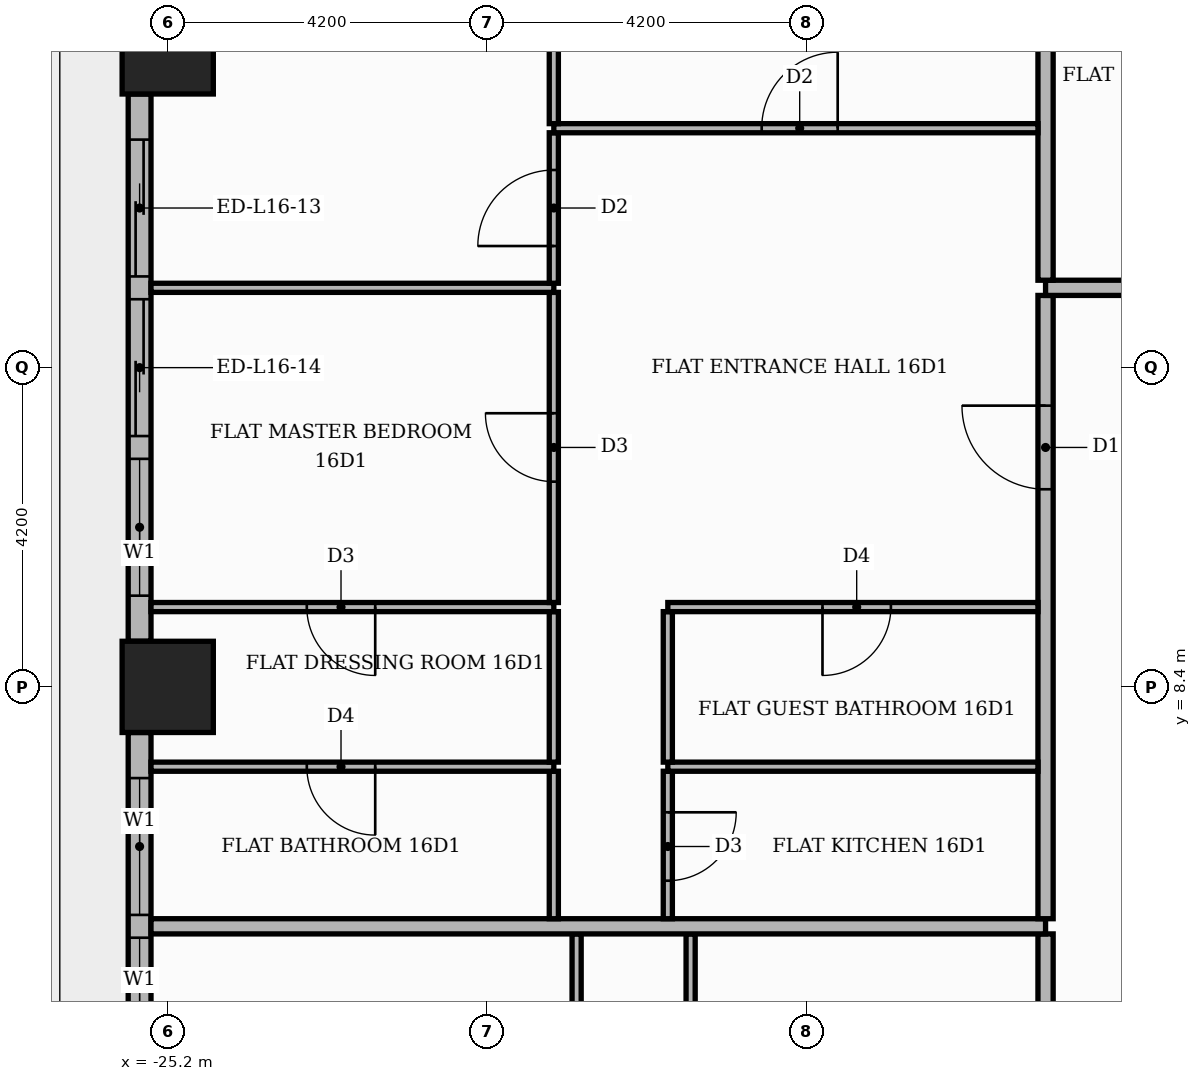
"""IFC4 building model, lengths in metres.
Left out: names, types, materials, properties, quantities, classifications, styles, units other than length and angle.
Written with IfcOpenShell. Run it as: python <this file> out.ifc"""

import sys

from ifc_helpers import new_model, si_unit, direction, frame, frame_2d, origin, origin_2d, place, context, subcontext, project, spatial, rectangle, extrude, element, fill, save


model = new_model("IFC4")
c1 = context("Model", 3, precision=1e-05, world=origin(), true_north=direction((0.0, 1.0)))
c2 = subcontext(c1, "Body", "Model", "MODEL_VIEW")
j1 = project(units=[si_unit("LENGTHUNIT", "METRE"), si_unit("PLANEANGLEUNIT", "RADIAN")], contexts=[c1])
p1 = place(None, origin())
s1 = spatial("IfcSite", under=j1, at=p1, CompositionType="ELEMENT")
p2 = place(p1, origin())
s2 = spatial("IfcBuilding", under=s1, at=p2, CompositionType="ELEMENT")
p3 = place(p2, frame((0.0, 0.0, 69.9)))
s3 = spatial("IfcBuildingStorey", under=s2, at=p3, CompositionType="ELEMENT", Elevation=69.9)
for number, where, z_axis, x_axis in (
    (1, (-25.2, 8.4, 0.0), (0.0, 0.0, 1.0), (1.0, 0.0, 0.0)),
    (2, (-25.2, 16.8, 0.0), (0.0, 0.0, 1.0), (1.0, 0.0, 0.0)),
):
    element("IfcColumn", number, at=place(p3, frame(where, z_axis=z_axis, x_axis=x_axis)), inside=s3, PredefinedType="COLUMN", context=c2, shape_type="SweptSolid", body=[
        extrude(rectangle(XDim=1.2, YDim=1.2, at=origin_2d()), origin(), (0.0, 0.0, 1.0), 3.9),
    ])
p4 = place(p3, frame((-25.57, 16.2, 0.0), z_axis=(0.0, 0.0, 1.0), x_axis=(0.0, -1.0, 0.0)))
e3 = element("IfcWall", 3, at=p4, inside=s3, PredefinedType="STANDARD", context=c2, shape_type="SweptSolid", body=[
    extrude(rectangle(XDim=7.2, YDim=0.3, at=frame_2d((3.6, 0.0))), origin(), (0.0, 0.0, 1.0), 3.4),
])
p5 = place(p4, frame((0.6, 0.0, 0.0)))
e4 = element("IfcOpeningElement", 4, at=p5, cuts=e3, PredefinedType="OPENING", context=c2, shape_type="SweptSolid", body=[
    extrude(rectangle(XDim=1.8, YDim=2.4, at=frame_2d((0.9, 1.2))), frame((0.0, 0.16, 0.0), z_axis=(0.0, -1.0, 0.0), x_axis=(1.0, 0.0, 0.0)), (0.0, 0.0, 1.0), 0.32),
])
p6 = place(p4, frame((2.7, 0.0, 0.0)))
e5 = element("IfcOpeningElement", 5, at=p6, cuts=e3, PredefinedType="OPENING", context=c2, shape_type="SweptSolid", body=[
    extrude(rectangle(XDim=1.8, YDim=2.4, at=frame_2d((0.9, 1.2))), frame((0.0, 0.16, 0.0), z_axis=(0.0, -1.0, 0.0), x_axis=(1.0, 0.0, 0.0)), (0.0, 0.0, 1.0), 0.32),
])
p7 = place(p4, frame((4.8, 0.0, 0.9)))
e6 = element("IfcOpeningElement", 6, at=p7, cuts=e3, PredefinedType="OPENING", context=c2, shape_type="SweptSolid", body=[
    extrude(rectangle(XDim=1.8, YDim=2.1, at=frame_2d((0.9, 1.05))), frame((0.0, 0.16, 0.0), z_axis=(0.0, -1.0, 0.0), x_axis=(1.0, 0.0, 0.0)), (0.0, 0.0, 1.0), 0.32),
])
p8 = place(p3, frame((-25.57, 7.8, 0.0), z_axis=(0.0, 0.0, 1.0), x_axis=(0.0, -1.0, 0.0)))
e7 = element("IfcWall", 7, at=p8, inside=s3, PredefinedType="STANDARD", context=c2, shape_type="SweptSolid", body=[
    extrude(rectangle(XDim=7.2, YDim=0.3, at=frame_2d((3.6, 0.0))), origin(), (0.0, 0.0, 1.0), 3.4),
])
p9 = place(p8, frame((0.6, 0.0, 0.9)))
e8 = element("IfcOpeningElement", 8, at=p9, cuts=e7, PredefinedType="OPENING", context=c2, shape_type="SweptSolid", body=[
    extrude(rectangle(XDim=1.8, YDim=2.1, at=frame_2d((0.9, 1.05))), frame((0.0, 0.16, 0.0), z_axis=(0.0, -1.0, 0.0), x_axis=(1.0, 0.0, 0.0)), (0.0, 0.0, 1.0), 0.32),
])
p10 = place(p8, frame((2.7, 0.0, 0.9)))
e9 = element("IfcOpeningElement", 9, at=p10, cuts=e7, PredefinedType="OPENING", context=c2, shape_type="SweptSolid", body=[
    extrude(rectangle(XDim=1.8, YDim=2.1, at=frame_2d((0.9, 1.05))), frame((0.0, 0.16, 0.0), z_axis=(0.0, -1.0, 0.0), x_axis=(1.0, 0.0, 0.0)), (0.0, 0.0, 1.0), 0.32),
])
p11 = place(p8, frame((4.8, 0.0, 0.0)))
e10 = element("IfcOpeningElement", 10, at=p11, cuts=e7, PredefinedType="OPENING", context=c2, shape_type="SweptSolid", body=[
    extrude(rectangle(XDim=1.8, YDim=2.4, at=frame_2d((0.9, 1.2))), frame((0.0, 0.16, 0.0), z_axis=(0.0, -1.0, 0.0), x_axis=(1.0, 0.0, 0.0)), (0.0, 0.0, 1.0), 0.32),
])
p12 = place(p3, frame((-13.65, -13.55, 0.0), z_axis=(0.0, 0.0, 1.0), x_axis=(0.0, 1.0, 0.0)))
e11 = element("IfcWall", 11, at=p12, inside=s3, PredefinedType="PARTITIONING", context=c2, shape_type="SweptSolid", body=[
    extrude(rectangle(XDim=18.7, YDim=0.2, at=frame_2d((9.35, 0.0))), origin(), (0.0, 0.0, 1.0), 3.4),
])
p13 = place(p12, frame((11.95, 0.0, 0.0)))
e12 = element("IfcOpeningElement", 12, at=p13, cuts=e11, PredefinedType="OPENING", context=c2, shape_type="SweptSolid", body=[
    extrude(rectangle(XDim=1.1, YDim=2.4, at=frame_2d((0.55, 1.2))), frame((0.0, 0.11, 0.0), z_axis=(0.0, -1.0, 0.0), x_axis=(1.0, 0.0, 0.0)), (0.0, 0.0, 1.0), 0.22),
])
p14 = place(p3, frame((-19.82, -3.09, 0.0), z_axis=(0.0, 0.0, 1.0), x_axis=(0.0, 1.0, 0.0)))
e13 = element("IfcWall", 13, at=p14, inside=s3, PredefinedType="PARTITIONING", context=c2, shape_type="SweptSolid", body=[
    extrude(rectangle(XDim=8.24, YDim=0.12, at=frame_2d((4.12, 0.0))), origin(), (0.0, 0.0, 1.0), 3.4),
])
p15 = place(p14, frame((3.64, 0.0, 0.0)))
e14 = element("IfcOpeningElement", 14, at=p15, cuts=e13, PredefinedType="OPENING", context=c2, shape_type="SweptSolid", body=[
    extrude(rectangle(XDim=1.0, YDim=2.1, at=frame_2d((0.5, 1.05))), frame((0.0, 0.07, 0.0), z_axis=(0.0, -1.0, 0.0), x_axis=(1.0, 0.0, 0.0)), (0.0, 0.0, 1.0), 0.14),
])
p16 = place(p3, frame((-18.32, 1.11, 0.0), z_axis=(0.0, 0.0, 1.0), x_axis=(0.0, 1.0, 0.0)))
e15 = element("IfcWall", 15, at=p16, inside=s3, PredefinedType="PARTITIONING", context=c2, shape_type="SweptSolid", body=[
    extrude(rectangle(XDim=4.04, YDim=0.12, at=frame_2d((2.02, 0.0))), origin(), (0.0, 0.0, 1.0), 3.4),
])
p17 = place(p3, frame((-25.42, 5.25, 0.0), z_axis=(0.0, 0.0, 1.0), x_axis=(1.0, 0.0, 0.0)))
e16 = element("IfcWall", 16, at=p17, inside=s3, PredefinedType="PARTITIONING", context=c2, shape_type="SweptSolid", body=[
    extrude(rectangle(XDim=11.77, YDim=0.2, at=frame_2d((5.885, 0.0))), origin(), (0.0, 0.0, 1.0), 3.4),
])
p18 = place(p3, frame((-20.12, 5.35, 0.0), z_axis=(0.0, 0.0, 1.0), x_axis=(0.0, 1.0, 0.0)))
e17 = element("IfcWall", 17, at=p18, inside=s3, PredefinedType="PARTITIONING", context=c2, shape_type="SweptSolid", body=[
    extrude(rectangle(XDim=1.94, YDim=0.12, at=frame_2d((0.97, 0.0))), origin(), (0.0, 0.0, 1.0), 3.4),
])
p19 = place(p3, frame((-18.62, 5.35, 0.0), z_axis=(0.0, 0.0, 1.0), x_axis=(0.0, 1.0, 0.0)))
e18 = element("IfcWall", 18, at=p19, inside=s3, PredefinedType="PARTITIONING", context=c2, shape_type="SweptSolid", body=[
    extrude(rectangle(XDim=1.94, YDim=0.12, at=frame_2d((0.97, 0.0))), origin(), (0.0, 0.0, 1.0), 3.4),
])
p20 = place(p19, frame((0.5, 0.0, 0.0)))
e19 = element("IfcOpeningElement", 19, at=p20, cuts=e18, PredefinedType="OPENING", context=c2, shape_type="SweptSolid", body=[
    extrude(rectangle(XDim=0.9, YDim=2.1, at=frame_2d((0.45, 1.05))), frame((0.0, 0.07, 0.0), z_axis=(0.0, -1.0, 0.0), x_axis=(1.0, 0.0, 0.0)), (0.0, 0.0, 1.0), 0.14),
])
p21 = place(p3, frame((-13.65, 5.35, 0.0), z_axis=(0.0, 0.0, 1.0), x_axis=(0.0, 1.0, 0.0)))
e20 = element("IfcWall", 20, at=p21, inside=s3, PredefinedType="PARTITIONING", context=c2, shape_type="SweptSolid", body=[
    extrude(rectangle(XDim=8.2, YDim=0.2, at=frame_2d((4.1, 0.0))), origin(), (0.0, 0.0, 1.0), 3.4),
])
p22 = place(p21, frame((5.65, 0.0, 0.0)))
e21 = element("IfcOpeningElement", 21, at=p22, cuts=e20, PredefinedType="OPENING", context=c2, shape_type="SweptSolid", body=[
    extrude(rectangle(XDim=1.1, YDim=2.4, at=frame_2d((0.55, 1.2))), frame((0.0, 0.11, 0.0), z_axis=(0.0, -1.0, 0.0), x_axis=(1.0, 0.0, 0.0)), (0.0, 0.0, 1.0), 0.22),
])
p23 = place(p3, frame((-25.42, 7.35, 0.0), z_axis=(0.0, 0.0, 1.0), x_axis=(1.0, 0.0, 0.0)))
e22 = element("IfcWall", 22, at=p23, inside=s3, PredefinedType="PARTITIONING", context=c2, shape_type="SweptSolid", body=[
    extrude(rectangle(XDim=5.3, YDim=0.12, at=frame_2d((2.65, 0.0))), origin(), (0.0, 0.0, 1.0), 3.4),
])
p24 = place(p23, frame((2.05, 0.0, 0.0)))
e23 = element("IfcOpeningElement", 23, at=p24, cuts=e22, PredefinedType="OPENING", context=c2, shape_type="SweptSolid", body=[
    extrude(rectangle(XDim=0.9, YDim=2.1, at=frame_2d((0.45, 1.05))), frame((0.0, 0.07, 0.0), z_axis=(0.0, -1.0, 0.0), x_axis=(1.0, 0.0, 0.0)), (0.0, 0.0, 1.0), 0.14),
])
p25 = place(p3, frame((-18.62, 7.35, 0.0), z_axis=(0.0, 0.0, 1.0), x_axis=(1.0, 0.0, 0.0)))
e24 = element("IfcWall", 24, at=p25, inside=s3, PredefinedType="PARTITIONING", context=c2, shape_type="SweptSolid", body=[
    extrude(rectangle(XDim=4.87, YDim=0.12, at=frame_2d((2.435, 0.0))), origin(), (0.0, 0.0, 1.0), 3.4),
])
for number, where, z_axis, x_axis in (
    (25, (-20.12, 7.41, 0.0), (0.0, 0.0, 1.0), (0.0, 1.0, 0.0)),
    (26, (-18.62, 7.41, 0.0), (0.0, 0.0, 1.0), (0.0, 1.0, 0.0)),
):
    element("IfcWall", number, at=place(p3, frame(where, z_axis=z_axis, x_axis=x_axis)), inside=s3, PredefinedType="PARTITIONING", context=c2, shape_type="SweptSolid", body=[
        extrude(rectangle(XDim=1.98, YDim=0.12, at=frame_2d((0.99, 0.0))), origin(), (0.0, 0.0, 1.0), 3.4),
    ])
p26 = place(p3, frame((-25.42, 9.45, 0.0), z_axis=(0.0, 0.0, 1.0), x_axis=(1.0, 0.0, 0.0)))
e27 = element("IfcWall", 27, at=p26, inside=s3, PredefinedType="PARTITIONING", context=c2, shape_type="SweptSolid", body=[
    extrude(rectangle(XDim=5.3, YDim=0.12, at=frame_2d((2.65, 0.0))), origin(), (0.0, 0.0, 1.0), 3.4),
])
p27 = place(p26, frame((2.05, 0.0, 0.0)))
e28 = element("IfcOpeningElement", 28, at=p27, cuts=e27, PredefinedType="OPENING", context=c2, shape_type="SweptSolid", body=[
    extrude(rectangle(XDim=0.9, YDim=2.1, at=frame_2d((0.45, 1.05))), frame((0.0, 0.07, 0.0), z_axis=(0.0, -1.0, 0.0), x_axis=(1.0, 0.0, 0.0)), (0.0, 0.0, 1.0), 0.14),
])
p28 = place(p3, frame((-18.62, 9.45, 0.0), z_axis=(0.0, 0.0, 1.0), x_axis=(1.0, 0.0, 0.0)))
e29 = element("IfcWall", 29, at=p28, inside=s3, PredefinedType="PARTITIONING", context=c2, shape_type="SweptSolid", body=[
    extrude(rectangle(XDim=4.87, YDim=0.12, at=frame_2d((2.435, 0.0))), origin(), (0.0, 0.0, 1.0), 3.4),
])
p29 = place(p28, frame((2.035, 0.0, 0.0)))
e30 = element("IfcOpeningElement", 30, at=p29, cuts=e29, PredefinedType="OPENING", context=c2, shape_type="SweptSolid", body=[
    extrude(rectangle(XDim=0.9, YDim=2.1, at=frame_2d((0.45, 1.05))), frame((0.0, 0.07, 0.0), z_axis=(0.0, -1.0, 0.0), x_axis=(1.0, 0.0, 0.0)), (0.0, 0.0, 1.0), 0.14),
])
p30 = place(p3, frame((-20.12, 9.51, 0.0), z_axis=(0.0, 0.0, 1.0), x_axis=(0.0, 1.0, 0.0)))
e31 = element("IfcWall", 31, at=p30, inside=s3, PredefinedType="PARTITIONING", context=c2, shape_type="SweptSolid", body=[
    extrude(rectangle(XDim=4.08, YDim=0.12, at=frame_2d((2.04, 0.0))), origin(), (0.0, 0.0, 1.0), 3.4),
])
p31 = place(p30, frame((1.59, 0.0, 0.0)))
e32 = element("IfcOpeningElement", 32, at=p31, cuts=e31, PredefinedType="OPENING", context=c2, shape_type="SweptSolid", body=[
    extrude(rectangle(XDim=0.9, YDim=2.1, at=frame_2d((0.45, 1.05))), frame((0.0, 0.07, 0.0), z_axis=(0.0, -1.0, 0.0), x_axis=(1.0, 0.0, 0.0)), (0.0, 0.0, 1.0), 0.14),
])
p32 = place(p3, frame((-25.42, 13.65, 0.0), z_axis=(0.0, 0.0, 1.0), x_axis=(1.0, 0.0, 0.0)))
e33 = element("IfcWall", 33, at=p32, inside=s3, PredefinedType="PARTITIONING", context=c2, shape_type="SweptSolid", body=[
    extrude(rectangle(XDim=5.3, YDim=0.12, at=frame_2d((2.65, 0.0))), origin(), (0.0, 0.0, 1.0), 3.4),
])
p33 = place(p3, frame((-13.65, 13.65, 0.0), z_axis=(0.0, 0.0, 1.0), x_axis=(1.0, 0.0, 0.0)))
e34 = element("IfcWall", 34, at=p33, inside=s3, PredefinedType="PARTITIONING", context=c2, shape_type="SweptSolid", body=[
    extrude(rectangle(XDim=39.07, YDim=0.2, at=frame_2d((19.535, 0.0))), origin(), (0.0, 0.0, 1.0), 3.4),
])
p34 = place(p33, frame((23.6, 0.0, 0.0)))
e35 = element("IfcOpeningElement", 35, at=p34, cuts=e34, PredefinedType="OPENING", context=c2, shape_type="SweptSolid", body=[
    extrude(rectangle(XDim=1.1, YDim=2.4, at=frame_2d((0.55, 1.2))), frame((0.0, 0.11, 0.0), z_axis=(0.0, -1.0, 0.0), x_axis=(1.0, 0.0, 0.0)), (0.0, 0.0, 1.0), 0.22),
])
p35 = place(p3, frame((-20.12, 13.71, 0.0), z_axis=(0.0, 0.0, 1.0), x_axis=(0.0, 1.0, 0.0)))
e36 = element("IfcWall", 36, at=p35, inside=s3, PredefinedType="PARTITIONING", context=c2, shape_type="SweptSolid", body=[
    extrude(rectangle(XDim=1.98, YDim=0.12, at=frame_2d((0.99, 0.0))), origin(), (0.0, 0.0, 1.0), 3.4),
])
p36 = place(p35, frame((0.49, 0.0, 0.0)))
e37 = element("IfcOpeningElement", 37, at=p36, cuts=e36, PredefinedType="OPENING", context=c2, shape_type="SweptSolid", body=[
    extrude(rectangle(XDim=1.0, YDim=2.1, at=frame_2d((0.5, 1.05))), frame((0.0, 0.07, 0.0), z_axis=(0.0, -1.0, 0.0), x_axis=(1.0, 0.0, 0.0)), (0.0, 0.0, 1.0), 0.14),
])
p37 = place(p3, frame((-13.65, 13.75, 0.0), z_axis=(0.0, 0.0, 1.0), x_axis=(0.0, 1.0, 0.0)))
e38 = element("IfcWall", 38, at=p37, inside=s3, PredefinedType="PARTITIONING", context=c2, shape_type="SweptSolid", body=[
    extrude(rectangle(XDim=11.67, YDim=0.2, at=frame_2d((5.835, 0.0))), origin(), (0.0, 0.0, 1.0), 3.4),
])
p38 = place(p3, frame((-20.12, 15.75, 0.0), z_axis=(0.0, 0.0, 1.0), x_axis=(1.0, 0.0, 0.0)))
e39 = element("IfcWall", 39, at=p38, inside=s3, PredefinedType="PARTITIONING", context=c2, shape_type="SweptSolid", body=[
    extrude(rectangle(XDim=6.37, YDim=0.12, at=frame_2d((3.185, 0.0))), origin(), (0.0, 0.0, 1.0), 3.4),
])
p39 = place(p38, frame((2.735, 0.0, 0.0)))
e40 = element("IfcOpeningElement", 40, at=p39, cuts=e39, PredefinedType="OPENING", context=c2, shape_type="SweptSolid", body=[
    extrude(rectangle(XDim=1.0, YDim=2.1, at=frame_2d((0.5, 1.05))), frame((0.0, 0.07, 0.0), z_axis=(0.0, -1.0, 0.0), x_axis=(1.0, 0.0, 0.0)), (0.0, 0.0, 1.0), 0.14),
])
p40 = place(p3, frame((-20.12, 15.81, 0.0), z_axis=(0.0, 0.0, 1.0), x_axis=(0.0, 1.0, 0.0)))
e41 = element("IfcWall", 41, at=p40, inside=s3, PredefinedType="PARTITIONING", context=c2, shape_type="SweptSolid", body=[
    extrude(rectangle(XDim=1.49, YDim=0.12, at=frame_2d((0.745, 0.0))), origin(), (0.0, 0.0, 1.0), 3.4),
])
p41 = place(p5, origin())
e42 = element("IfcDoor", 42, at=p41, inside=s3, OperationType="SLIDING_TO_LEFT", PredefinedType="DOOR", context=c2, shape_type="SweptSolid", body=[
    extrude(rectangle(XDim=1.8, YDim=2.4, at=frame_2d((0.9, 1.2))), frame((0.0, 0.025, 0.0), z_axis=(0.0, -1.0, 0.0), x_axis=(1.0, 0.0, 0.0)), (0.0, 0.0, 1.0), 0.05),
])
fill(e4, e42)
p42 = place(p6, origin())
e43 = element("IfcDoor", 43, at=p42, inside=s3, OperationType="SLIDING_TO_RIGHT", PredefinedType="DOOR", context=c2, shape_type="SweptSolid", body=[
    extrude(rectangle(XDim=1.8, YDim=2.4, at=frame_2d((0.9, 1.2))), frame((0.0, 0.025, 0.0), z_axis=(0.0, -1.0, 0.0), x_axis=(1.0, 0.0, 0.0)), (0.0, 0.0, 1.0), 0.05),
])
fill(e5, e43)
p43 = place(p7, origin())
e44 = element("IfcWindow", 44, at=p43, inside=s3, PartitioningType="SINGLE_PANEL", PredefinedType="WINDOW", context=c2, shape_type="SweptSolid", body=[
    extrude(rectangle(XDim=1.8, YDim=2.1, at=frame_2d((0.9, 1.05))), frame((0.0, 0.03, 0.0), z_axis=(0.0, -1.0, 0.0), x_axis=(1.0, 0.0, 0.0)), (0.0, 0.0, 1.0), 0.06),
])
fill(e6, e44)
p44 = place(p9, origin())
e45 = element("IfcWindow", 45, at=p44, inside=s3, PartitioningType="SINGLE_PANEL", PredefinedType="WINDOW", context=c2, shape_type="SweptSolid", body=[
    extrude(rectangle(XDim=1.8, YDim=2.1, at=frame_2d((0.9, 1.05))), frame((0.0, 0.03, 0.0), z_axis=(0.0, -1.0, 0.0), x_axis=(1.0, 0.0, 0.0)), (0.0, 0.0, 1.0), 0.06),
])
fill(e8, e45)
p45 = place(p10, origin())
e46 = element("IfcWindow", 46, at=p45, inside=s3, PartitioningType="SINGLE_PANEL", PredefinedType="WINDOW", context=c2, shape_type="SweptSolid", body=[
    extrude(rectangle(XDim=1.8, YDim=2.1, at=frame_2d((0.9, 1.05))), frame((0.0, 0.03, 0.0), z_axis=(0.0, -1.0, 0.0), x_axis=(1.0, 0.0, 0.0)), (0.0, 0.0, 1.0), 0.06),
])
fill(e9, e46)
p46 = place(p22, origin())
e47 = element("IfcDoor", 47, at=p46, inside=s3, OperationType="SINGLE_SWING_RIGHT", PredefinedType="DOOR", context=c2, shape_type="SweptSolid", body=[
    extrude(rectangle(XDim=1.1, YDim=2.4, at=frame_2d((0.55, 1.2))), frame((0.0, 0.025, 0.0), z_axis=(0.0, -1.0, 0.0), x_axis=(1.0, 0.0, 0.0)), (0.0, 0.0, 1.0), 0.05),
])
fill(e21, e47)
p47 = place(p39, origin())
e48 = element("IfcDoor", 48, at=p47, inside=s3, OperationType="SINGLE_SWING_RIGHT", PredefinedType="DOOR", context=c2, shape_type="SweptSolid", body=[
    extrude(rectangle(XDim=1.0, YDim=2.1, at=frame_2d((0.5, 1.05))), frame((0.0, 0.025, 0.0), z_axis=(0.0, -1.0, 0.0), x_axis=(1.0, 0.0, 0.0)), (0.0, 0.0, 1.0), 0.05),
])
fill(e40, e48)
p48 = place(p29, frame((0.9, 0.0, 0.0), z_axis=(0.0, 0.0, 1.0), x_axis=(-1.0, 0.0, 0.0)))
e49 = element("IfcDoor", 49, at=p48, inside=s3, OperationType="SINGLE_SWING_LEFT", PredefinedType="DOOR", context=c2, shape_type="SweptSolid", body=[
    extrude(rectangle(XDim=0.9, YDim=2.1, at=frame_2d((0.45, 1.05))), frame((0.0, 0.025, 0.0), z_axis=(0.0, -1.0, 0.0), x_axis=(1.0, 0.0, 0.0)), (0.0, 0.0, 1.0), 0.05),
])
fill(e30, e49)
p49 = place(p20, frame((0.9, 0.0, 0.0), z_axis=(0.0, 0.0, 1.0), x_axis=(-1.0, 0.0, 0.0)))
e50 = element("IfcDoor", 50, at=p49, inside=s3, OperationType="SINGLE_SWING_RIGHT", PredefinedType="DOOR", context=c2, shape_type="SweptSolid", body=[
    extrude(rectangle(XDim=0.9, YDim=2.1, at=frame_2d((0.45, 1.05))), frame((0.0, 0.025, 0.0), z_axis=(0.0, -1.0, 0.0), x_axis=(1.0, 0.0, 0.0)), (0.0, 0.0, 1.0), 0.05),
])
fill(e19, e50)
p50 = place(p36, origin())
e51 = element("IfcDoor", 51, at=p50, inside=s3, OperationType="SINGLE_SWING_LEFT", PredefinedType="DOOR", context=c2, shape_type="SweptSolid", body=[
    extrude(rectangle(XDim=1.0, YDim=2.1, at=frame_2d((0.5, 1.05))), frame((0.0, 0.025, 0.0), z_axis=(0.0, -1.0, 0.0), x_axis=(1.0, 0.0, 0.0)), (0.0, 0.0, 1.0), 0.05),
])
fill(e37, e51)
p51 = place(p31, origin())
e52 = element("IfcDoor", 52, at=p51, inside=s3, OperationType="SINGLE_SWING_RIGHT", PredefinedType="DOOR", context=c2, shape_type="SweptSolid", body=[
    extrude(rectangle(XDim=0.9, YDim=2.1, at=frame_2d((0.45, 1.05))), frame((0.0, 0.025, 0.0), z_axis=(0.0, -1.0, 0.0), x_axis=(1.0, 0.0, 0.0)), (0.0, 0.0, 1.0), 0.05),
])
fill(e32, e52)
p52 = place(p27, frame((0.9, 0.0, 0.0), z_axis=(0.0, 0.0, 1.0), x_axis=(-1.0, 0.0, 0.0)))
e53 = element("IfcDoor", 53, at=p52, inside=s3, OperationType="SINGLE_SWING_RIGHT", PredefinedType="DOOR", context=c2, shape_type="SweptSolid", body=[
    extrude(rectangle(XDim=0.9, YDim=2.1, at=frame_2d((0.45, 1.05))), frame((0.0, 0.025, 0.0), z_axis=(0.0, -1.0, 0.0), x_axis=(1.0, 0.0, 0.0)), (0.0, 0.0, 1.0), 0.05),
])
fill(e28, e53)
p53 = place(p24, frame((0.9, 0.0, 0.0), z_axis=(0.0, 0.0, 1.0), x_axis=(-1.0, 0.0, 0.0)))
e54 = element("IfcDoor", 54, at=p53, inside=s3, OperationType="SINGLE_SWING_RIGHT", PredefinedType="DOOR", context=c2, shape_type="SweptSolid", body=[
    extrude(rectangle(XDim=0.9, YDim=2.1, at=frame_2d((0.45, 1.05))), frame((0.0, 0.025, 0.0), z_axis=(0.0, -1.0, 0.0), x_axis=(1.0, 0.0, 0.0)), (0.0, 0.0, 1.0), 0.05),
])
fill(e23, e54)
save(model, sys.argv[1])
